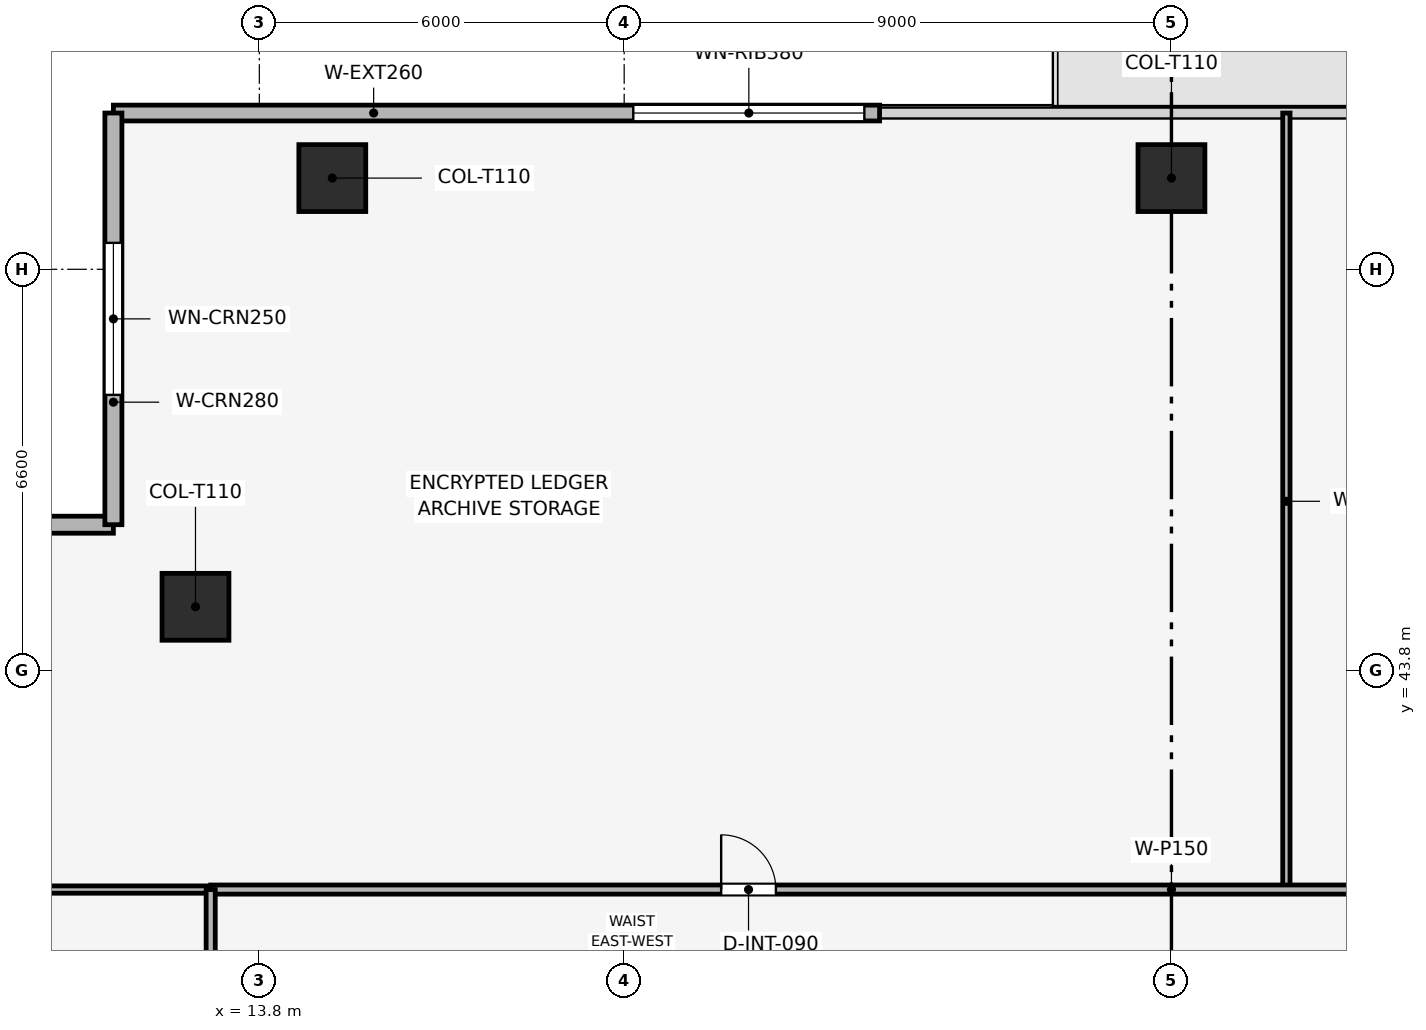
"""IFC4 building model, lengths in metres.
Left out: names, types, materials, properties, quantities, classifications, styles, units other than length and angle.
Written with IfcOpenShell. Run it as: python <this file> out.ifc"""

import sys

from ifc_helpers import new_model, si_unit, direction, frame, frame_2d, origin, origin_2d, place, context, subcontext, project, spatial, rectangle, extrude, element, fill, save


model = new_model("IFC4")
c1 = context("Model", 3, precision=1e-05, world=origin(), true_north=direction((0.0, 1.0)))
c2 = subcontext(c1, "Body", "Model", "MODEL_VIEW")
j1 = project(units=[si_unit("LENGTHUNIT", "METRE"), si_unit("PLANEANGLEUNIT", "RADIAN")], contexts=[c1])
p1 = place(None, origin())
s1 = spatial("IfcSite", under=j1, at=p1, CompositionType="ELEMENT")
p2 = place(p1, origin())
s2 = spatial("IfcBuilding", under=s1, at=p2, CompositionType="ELEMENT")
p3 = place(p2, frame((0.0, 0.0, 149.55)))
s3 = spatial("IfcBuildingStorey", under=s2, at=p3, CompositionType="ELEMENT", Elevation=149.55)
for number, where, z_axis, x_axis in (
    (1, (28.8, 51.9, 0.003), (0.0, 0.0, 1.0), (1.0, 0.0, 0.0)),
    (2, (15.0, 51.9, 0.003), (0.0, 0.0, 1.0), (1.0, 0.0, 0.0)),
    (3, (12.75, 44.85, 0.003), (0.0, 0.0, 1.0), (1.0, 0.0, 0.0)),
):
    element("IfcColumn", number, at=place(p3, frame(where, z_axis=z_axis, x_axis=x_axis)), inside=s3, PredefinedType="COLUMN", context=c2, shape_type="SweptSolid", body=[
        extrude(rectangle(XDim=1.1, YDim=1.1, at=origin_2d()), origin(), (0.0, 0.0, 1.0), 3.489),
    ])
p4 = place(p3, frame((11.4, 52.97, 0.0), z_axis=(0.0, 0.0, 1.0), x_axis=(1.0, 0.0, 0.0)))
e4 = element("IfcWall", 4, at=p4, inside=s3, PredefinedType="SOLIDWALL", context=c2, shape_type="SweptSolid", body=[
    extrude(rectangle(XDim=12.6, YDim=0.26, at=frame_2d((6.3, 0.0))), origin(), (0.0, 0.0, 1.0), 3.495),
])
p5 = place(p4, frame((8.55, 0.0, 0.9)))
e5 = element("IfcOpeningElement", 5, at=p5, cuts=e4, PredefinedType="OPENING", context=c2, shape_type="SweptSolid", body=[
    extrude(rectangle(XDim=3.8, YDim=1.9, at=frame_2d((1.9, 0.95))), frame((0.0, 0.14, 0.0), z_axis=(0.0, -1.0, 0.0), x_axis=(1.0, 0.0, 0.0)), (0.0, 0.0, 1.0), 0.28),
])
p6 = place(p3, frame((4.63, 46.2, 0.0), z_axis=(0.0, 0.0, 1.0), x_axis=(1.0, 0.0, 0.0)))
e6 = element("IfcWall", 6, at=p6, inside=s3, PredefinedType="SOLIDWALL", context=c2, shape_type="SweptSolid", body=[
    extrude(rectangle(XDim=6.77, YDim=0.28, at=frame_2d((3.385, 0.0))), origin(), (0.0, 0.0, 1.0), 3.495),
])
p7 = place(p6, frame((2.135, 0.0, 0.9)))
e7 = element("IfcOpeningElement", 7, at=p7, cuts=e6, PredefinedType="OPENING", context=c2, shape_type="SweptSolid", body=[
    extrude(rectangle(XDim=2.5, YDim=1.9, at=frame_2d((1.25, 0.95))), frame((0.0, 0.15, 0.0), z_axis=(0.0, -1.0, 0.0), x_axis=(1.0, 0.0, 0.0)), (0.0, 0.0, 1.0), 0.3),
])
p8 = place(p3, frame((11.4, 46.2, 0.0), z_axis=(0.0, 0.0, 1.0), x_axis=(0.0, 1.0, 0.0)))
e8 = element("IfcWall", 8, at=p8, inside=s3, PredefinedType="SOLIDWALL", context=c2, shape_type="SweptSolid", body=[
    extrude(rectangle(XDim=6.77, YDim=0.28, at=frame_2d((3.385, 0.0))), origin(), (0.0, 0.0, 1.0), 3.495),
])
p9 = place(p8, frame((2.135, 0.0, 0.9)))
e9 = element("IfcOpeningElement", 9, at=p9, cuts=e8, PredefinedType="OPENING", context=c2, shape_type="SweptSolid", body=[
    extrude(rectangle(XDim=2.5, YDim=1.9, at=frame_2d((1.25, 0.95))), frame((0.0, 0.15, 0.0), z_axis=(0.0, -1.0, 0.0), x_axis=(1.0, 0.0, 0.0)), (0.0, 0.0, 1.0), 0.3),
])
p10 = place(p3, frame((30.69, 40.2, 0.0), z_axis=(0.0, 0.0, 1.0), x_axis=(0.0, 1.0, 0.0)))
e10 = element("IfcWall", 10, at=p10, inside=s3, PredefinedType="PARTITIONING", context=c2, shape_type="SweptSolid", body=[
    extrude(rectangle(XDim=12.77, YDim=0.12, at=frame_2d((6.385, 0.0))), origin(), (0.0, 0.0, 1.0), 2.98),
])
p11 = place(p3, frame((4.63, 40.2, 0.0), z_axis=(0.0, 0.0, 1.0), x_axis=(1.0, 0.0, 0.0)))
e11 = element("IfcWall", 11, at=p11, inside=s3, PredefinedType="PARTITIONING", context=c2, shape_type="SweptSolid", body=[
    extrude(rectangle(XDim=8.37, YDim=0.12, at=frame_2d((4.185, 0.0))), origin(), (0.0, 0.0, 1.0), 2.98),
])
p12 = place(p3, frame((13.0, 40.2, 0.0), z_axis=(0.0, 0.0, 1.0), x_axis=(1.0, 0.0, 0.0)))
e12 = element("IfcWall", 12, at=p12, inside=s3, PredefinedType="PARTITIONING", context=c2, shape_type="SweptSolid", body=[
    extrude(rectangle(XDim=31.6, YDim=0.15, at=frame_2d((15.8, 0.0))), origin(), (0.0, 0.0, 1.0), 3.03),
])
p13 = place(p12, frame((8.395, 0.0, 0.0)))
e13 = element("IfcOpeningElement", 13, at=p13, cuts=e12, PredefinedType="OPENING", context=c2, shape_type="SweptSolid", body=[
    extrude(rectangle(XDim=0.9, YDim=2.1, at=frame_2d((0.45, 1.05))), frame((0.0, 0.085, 0.0), z_axis=(0.0, -1.0, 0.0), x_axis=(1.0, 0.0, 0.0)), (0.0, 0.0, 1.0), 0.17),
])
p14 = place(p12, frame((24.195, 0.0, 0.0)))
e14 = element("IfcOpeningElement", 14, at=p14, cuts=e12, PredefinedType="OPENING", context=c2, shape_type="SweptSolid", body=[
    extrude(rectangle(XDim=0.9, YDim=2.1, at=frame_2d((0.45, 1.05))), frame((0.0, 0.085, 0.0), z_axis=(0.0, -1.0, 0.0), x_axis=(1.0, 0.0, 0.0)), (0.0, 0.0, 1.0), 0.17),
])
p15 = place(p3, frame((13.0, 17.4, 0.0), z_axis=(0.0, 0.0, 1.0), x_axis=(0.0, 1.0, 0.0)))
e15 = element("IfcWall", 15, at=p15, inside=s3, PredefinedType="PARTITIONING", context=c2, shape_type="SweptSolid", body=[
    extrude(rectangle(XDim=22.8, YDim=0.15, at=frame_2d((11.4, 0.0))), origin(), (0.0, 0.0, 1.0), 3.03),
])
p16 = place(p15, frame((10.95, 0.0, 0.0)))
e16 = element("IfcOpeningElement", 16, at=p16, cuts=e15, PredefinedType="OPENING", context=c2, shape_type="SweptSolid", body=[
    extrude(rectangle(XDim=0.9, YDim=2.1, at=frame_2d((0.45, 1.05))), frame((0.0, 0.085, 0.0), z_axis=(0.0, -1.0, 0.0), x_axis=(1.0, 0.0, 0.0)), (0.0, 0.0, 1.0), 0.17),
])
p17 = place(p5, origin())
e17 = element("IfcWindow", 17, at=p17, inside=s3, PartitioningType="SINGLE_PANEL", PredefinedType="WINDOW", context=c2, shape_type="SweptSolid", body=[
    extrude(rectangle(XDim=3.8, YDim=1.9, at=frame_2d((1.9, 0.95))), frame((0.0, 0.03, 0.0), z_axis=(0.0, -1.0, 0.0), x_axis=(1.0, 0.0, 0.0)), (0.0, 0.0, 1.0), 0.06),
])
fill(e5, e17)
p18 = place(p9, origin())
e18 = element("IfcWindow", 18, at=p18, inside=s3, PartitioningType="SINGLE_PANEL", PredefinedType="WINDOW", context=c2, shape_type="SweptSolid", body=[
    extrude(rectangle(XDim=2.5, YDim=1.9, at=frame_2d((1.25, 0.95))), frame((0.0, 0.03, 0.0), z_axis=(0.0, -1.0, 0.0), x_axis=(1.0, 0.0, 0.0)), (0.0, 0.0, 1.0), 0.06),
])
fill(e9, e18)
p19 = place(p13, origin())
e19 = element("IfcDoor", 19, at=p19, inside=s3, OperationType="SINGLE_SWING_LEFT", PredefinedType="DOOR", context=c2, shape_type="SweptSolid", body=[
    extrude(rectangle(XDim=0.9, YDim=2.1, at=frame_2d((0.45, 1.05))), frame((0.0, 0.025, 0.0), z_axis=(0.0, -1.0, 0.0), x_axis=(1.0, 0.0, 0.0)), (0.0, 0.0, 1.0), 0.05),
])
fill(e13, e19)
save(model, sys.argv[1])
